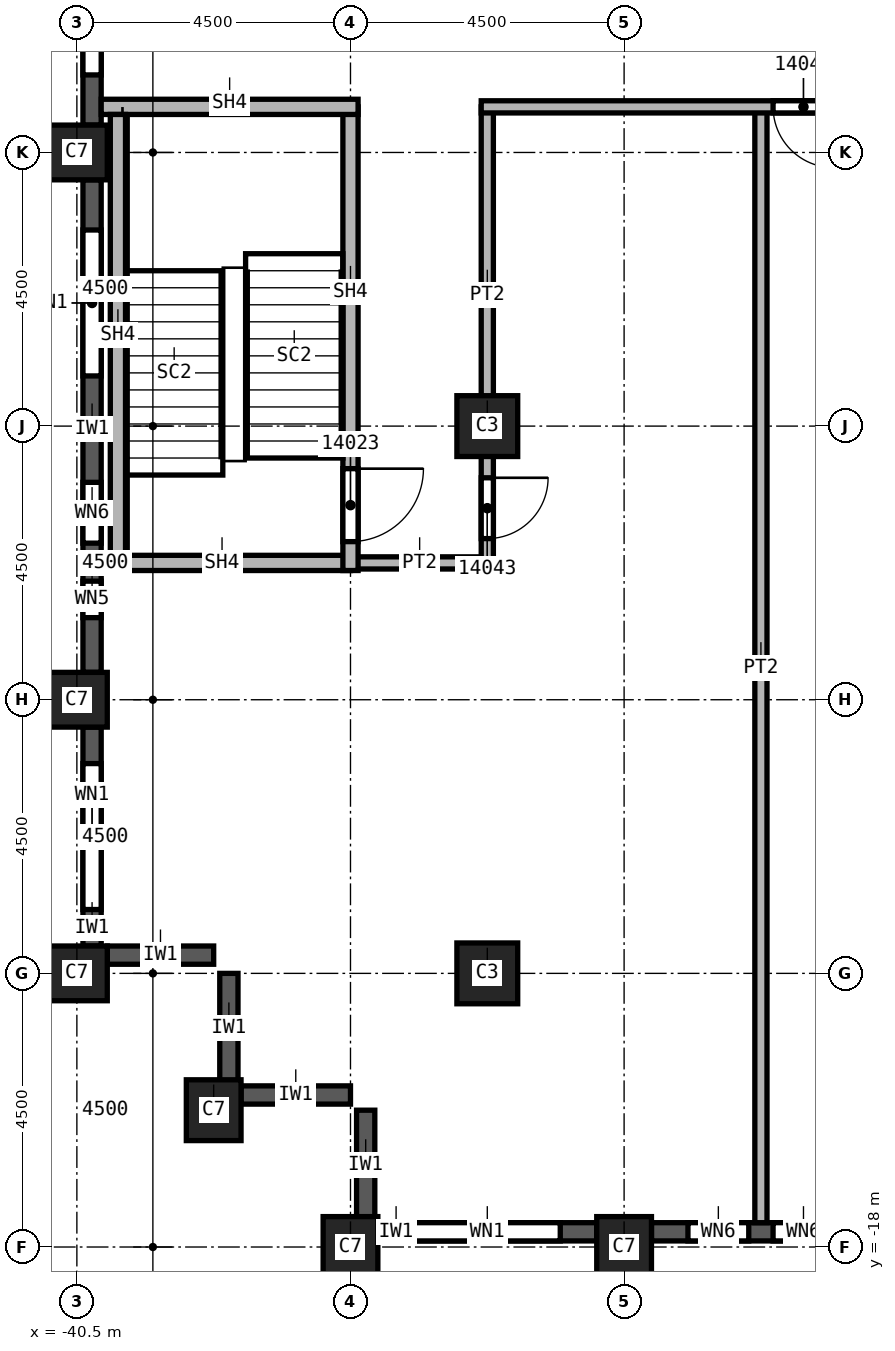
"""IFC4 building model, lengths in metres.
Left out: names, types, materials, properties, quantities, classifications, styles, units other than length and angle.
Written with IfcOpenShell. Run it as: python <this file> out.ifc"""

import sys

from ifc_helpers import new_model, si_unit, direction, frame, frame_2d, origin, origin_2d, place, context, subcontext, project, spatial, rectangle, extrude, element, fill, save


model = new_model("IFC4")
c1 = context("Model", 3, precision=1e-05, world=origin(), true_north=direction((0.0, 1.0)))
c2 = subcontext(c1, "Body", "Model", "MODEL_VIEW")
j1 = project(units=[si_unit("LENGTHUNIT", "METRE"), si_unit("PLANEANGLEUNIT", "RADIAN")], contexts=[c1])
p1 = place(None, origin())
s1 = spatial("IfcSite", under=j1, at=p1, CompositionType="ELEMENT")
p2 = place(p1, origin())
s2 = spatial("IfcBuilding", under=s1, at=p2, CompositionType="ELEMENT")
p3 = place(p2, frame((0.0, 0.0, 220.0)))
s3 = spatial("IfcBuildingStorey", under=s2, at=p3, CompositionType="ELEMENT", Elevation=220.0)
for number, where, z_axis, x_axis in (
    (1, (-40.5, 0.0, 0.0), (0.0, 0.0, 1.0), (0.0, 1.0, 0.0)),
    (2, (-40.5, -9.0, 0.0), (0.0, 0.0, 1.0), (0.0, 1.0, 0.0)),
    (3, (-40.5, -13.5, 0.0), (0.0, 0.0, 1.0), (0.0, 1.0, 0.0)),
    (4, (-38.25, -15.75, 0.0), (0.0, 0.0, 1.0), (1.0, 0.0, 0.0)),
    (5, (-31.5, -18.0, 0.0), (0.0, 0.0, 1.0), (1.0, 0.0, 0.0)),
    (6, (-36.0, -18.0, 0.0), (0.0, 0.0, 1.0), (1.0, 0.0, 0.0)),
):
    element("IfcColumn", number, at=place(p3, frame(where, z_axis=z_axis, x_axis=x_axis)), inside=s3, PredefinedType="COLUMN", context=c2, shape_type="SweptSolid", body=[
        extrude(rectangle(XDim=0.9, YDim=1.0, at=origin_2d()), origin(), (0.0, 0.0, 1.0), 3.72),
    ])
for number, where, z_axis, x_axis in (
    (7, (-33.75, -4.5, 0.0), (0.0, 0.0, 1.0), (1.0, 0.0, 0.0)),
    (8, (-33.75, -13.5, 0.0), (0.0, 0.0, 1.0), (1.0, 0.0, 0.0)),
):
    element("IfcColumn", number, at=place(p3, frame(where, z_axis=z_axis, x_axis=x_axis)), inside=s3, PredefinedType="COLUMN", context=c2, shape_type="SweptSolid", body=[
        extrude(rectangle(XDim=1.0, YDim=1.0, at=origin_2d()), origin(), (0.0, 0.0, 1.0), 3.72),
    ])
p4 = place(p3, frame((-40.0, -13.2, 0.0), z_axis=(0.0, 0.0, 1.0), x_axis=(1.0, 0.0, 0.0)))
e9 = element("IfcWall", 9, at=p4, inside=s3, PredefinedType="SOLIDWALL", context=c2, shape_type="SweptSolid", body=[
    extrude(rectangle(XDim=1.75, YDim=0.3, at=frame_2d((0.875, 0.0))), origin(), (0.0, 0.0, 1.0), 3.12),
])
for number, where, z_axis, x_axis in (
    (10, (-38.0, -15.3, 0.0), (0.0, 0.0, 1.0), (0.0, 1.0, 0.0)),
    (11, (-37.8, -15.5, 0.0), (0.0, 0.0, 1.0), (1.0, 0.0, 0.0)),
    (12, (-35.75, -17.55, 0.0), (0.0, 0.0, 1.0), (0.0, 1.0, 0.0)),
):
    element("IfcWall", number, at=place(p3, frame(where, z_axis=z_axis, x_axis=x_axis)), inside=s3, PredefinedType="SOLIDWALL", context=c2, shape_type="SweptSolid", body=[
        extrude(rectangle(XDim=1.8, YDim=0.3, at=frame_2d((0.9, 0.0))), origin(), (0.0, 0.0, 1.0), 3.12),
    ])
p5 = place(p3, frame((-40.25, 8.55, 0.0), z_axis=(0.0, 0.0, 1.0), x_axis=(0.0, -1.0, 0.0)))
e13 = element("IfcWall", 13, at=p5, inside=s3, PredefinedType="SOLIDWALL", context=c2, shape_type="SweptSolid", body=[
    extrude(rectangle(XDim=8.1, YDim=0.3, at=frame_2d((4.05, 0.0))), origin(), (0.0, 0.0, 1.0), 3.12),
])
p6 = place(p5, frame((0.825, 0.0, 0.8)))
e14 = element("IfcOpeningElement", 14, at=p6, cuts=e13, PredefinedType="OPENING", context=c2, shape_type="SweptSolid", body=[
    extrude(rectangle(XDim=2.4, YDim=1.95, at=frame_2d((1.2, 0.975))), frame((0.0, 0.15, 0.0), z_axis=(0.0, -1.0, 0.0), x_axis=(1.0, 0.0, 0.0)), (0.0, 0.0, 1.0), 0.3),
])
p7 = place(p5, frame((4.875, 0.0, 0.8)))
e15 = element("IfcOpeningElement", 15, at=p7, cuts=e13, PredefinedType="OPENING", context=c2, shape_type="SweptSolid", body=[
    extrude(rectangle(XDim=2.4, YDim=1.95, at=frame_2d((1.2, 0.975))), frame((0.0, 0.15, 0.0), z_axis=(0.0, -1.0, 0.0), x_axis=(1.0, 0.0, 0.0)), (0.0, 0.0, 1.0), 0.3),
])
p8 = place(p3, frame((-40.25, -0.45, 0.0), z_axis=(0.0, 0.0, 1.0), x_axis=(0.0, -1.0, 0.0)))
e16 = element("IfcWall", 16, at=p8, inside=s3, PredefinedType="SOLIDWALL", context=c2, shape_type="SweptSolid", body=[
    extrude(rectangle(XDim=8.1, YDim=0.3, at=frame_2d((4.05, 0.0))), origin(), (0.0, 0.0, 1.0), 3.12),
])
p9 = place(p8, frame((0.825, 0.0, 0.8)))
e17 = element("IfcOpeningElement", 17, at=p9, cuts=e16, PredefinedType="OPENING", context=c2, shape_type="SweptSolid", body=[
    extrude(rectangle(XDim=2.4, YDim=1.95, at=frame_2d((1.2, 0.975))), frame((0.0, 0.15, 0.0), z_axis=(0.0, -1.0, 0.0), x_axis=(1.0, 0.0, 0.0)), (0.0, 0.0, 1.0), 0.3),
])
p10 = place(p8, frame((4.975, 0.0, 0.8)))
e18 = element("IfcOpeningElement", 18, at=p10, cuts=e16, PredefinedType="OPENING", context=c2, shape_type="SweptSolid", body=[
    extrude(rectangle(XDim=1.0, YDim=1.95, at=frame_2d((0.5, 0.975))), frame((0.0, 0.15, 0.0), z_axis=(0.0, -1.0, 0.0), x_axis=(1.0, 0.0, 0.0)), (0.0, 0.0, 1.0), 0.3),
])
p11 = place(p8, frame((6.6, 0.0, 0.8)))
e19 = element("IfcOpeningElement", 19, at=p11, cuts=e16, PredefinedType="OPENING", context=c2, shape_type="SweptSolid", body=[
    extrude(rectangle(XDim=0.6, YDim=1.95, at=frame_2d((0.3, 0.975))), frame((0.0, 0.15, 0.0), z_axis=(0.0, -1.0, 0.0), x_axis=(1.0, 0.0, 0.0)), (0.0, 0.0, 1.0), 0.3),
])
p12 = place(p3, frame((-40.25, -9.45, 0.0), z_axis=(0.0, 0.0, 1.0), x_axis=(0.0, -1.0, 0.0)))
e20 = element("IfcWall", 20, at=p12, inside=s3, PredefinedType="SOLIDWALL", context=c2, shape_type="SweptSolid", body=[
    extrude(rectangle(XDim=3.6, YDim=0.3, at=frame_2d((1.8, 0.0))), origin(), (0.0, 0.0, 1.0), 3.12),
])
p13 = place(p12, frame((0.6, 0.0, 0.8)))
e21 = element("IfcOpeningElement", 21, at=p13, cuts=e20, PredefinedType="OPENING", context=c2, shape_type="SweptSolid", body=[
    extrude(rectangle(XDim=2.4, YDim=1.95, at=frame_2d((1.2, 0.975))), frame((0.0, 0.15, 0.0), z_axis=(0.0, -1.0, 0.0), x_axis=(1.0, 0.0, 0.0)), (0.0, 0.0, 1.0), 0.3),
])
p14 = place(p3, frame((-35.55, -17.75, 0.0), z_axis=(0.0, 0.0, 1.0), x_axis=(1.0, 0.0, 0.0)))
e22 = element("IfcWall", 22, at=p14, inside=s3, PredefinedType="SOLIDWALL", context=c2, shape_type="SweptSolid", body=[
    extrude(rectangle(XDim=3.6, YDim=0.3, at=frame_2d((1.8, 0.0))), origin(), (0.0, 0.0, 1.0), 3.12),
])
p15 = place(p14, frame((0.6, 0.0, 0.8)))
e23 = element("IfcOpeningElement", 23, at=p15, cuts=e22, PredefinedType="OPENING", context=c2, shape_type="SweptSolid", body=[
    extrude(rectangle(XDim=2.4, YDim=1.95, at=frame_2d((1.2, 0.975))), frame((0.0, 0.15, 0.0), z_axis=(0.0, -1.0, 0.0), x_axis=(1.0, 0.0, 0.0)), (0.0, 0.0, 1.0), 0.3),
])
p16 = place(p3, frame((-31.05, -17.75, 0.0), z_axis=(0.0, 0.0, 1.0), x_axis=(1.0, 0.0, 0.0)))
e24 = element("IfcWall", 24, at=p16, inside=s3, PredefinedType="SOLIDWALL", context=c2, shape_type="SweptSolid", body=[
    extrude(rectangle(XDim=3.6, YDim=0.3, at=frame_2d((1.8, 0.0))), origin(), (0.0, 0.0, 1.0), 3.12),
])
p17 = place(p16, frame((0.6, 0.0, 0.8)))
e25 = element("IfcOpeningElement", 25, at=p17, cuts=e24, PredefinedType="OPENING", context=c2, shape_type="SweptSolid", body=[
    extrude(rectangle(XDim=1.0, YDim=1.95, at=frame_2d((0.5, 0.975))), frame((0.0, 0.15, 0.0), z_axis=(0.0, -1.0, 0.0), x_axis=(1.0, 0.0, 0.0)), (0.0, 0.0, 1.0), 0.3),
])
p18 = place(p16, frame((2.0, 0.0, 0.8)))
e26 = element("IfcOpeningElement", 26, at=p18, cuts=e24, PredefinedType="OPENING", context=c2, shape_type="SweptSolid", body=[
    extrude(rectangle(XDim=1.0, YDim=1.95, at=frame_2d((0.5, 0.975))), frame((0.0, 0.15, 0.0), z_axis=(0.0, -1.0, 0.0), x_axis=(1.0, 0.0, 0.0)), (0.0, 0.0, 1.0), 0.3),
])
p19 = place(p3, frame((-33.75, -6.75, 0.0), z_axis=(0.0, 0.0, 1.0), x_axis=(-1.0, 0.0, 0.0)))
e27 = element("IfcWall", 27, at=p19, inside=s3, PredefinedType="PARTITIONING", context=c2, shape_type="SweptSolid", body=[
    extrude(rectangle(XDim=2.25, YDim=0.2, at=frame_2d((1.125, 0.0))), origin(), (0.0, 0.0, 1.0), 3.72),
])
p20 = place(p3, frame((-33.75, 0.75, 0.0), z_axis=(0.0, 0.0, 1.0), x_axis=(0.0, -1.0, 0.0)))
e28 = element("IfcWall", 28, at=p20, inside=s3, PredefinedType="PARTITIONING", context=c2, shape_type="SweptSolid", body=[
    extrude(rectangle(XDim=7.6, YDim=0.2, at=frame_2d((3.8, 0.0))), origin(), (0.0, 0.0, 1.0), 3.72),
])
p21 = place(p20, frame((6.1, 0.0, 0.0)))
e29 = element("IfcOpeningElement", 29, at=p21, cuts=e28, PredefinedType="OPENING", context=c2, shape_type="SweptSolid", body=[
    extrude(rectangle(XDim=1.0, YDim=2.1, at=frame_2d((0.5, 1.05))), frame((0.0, 0.1, 0.0), z_axis=(0.0, -1.0, 0.0), x_axis=(1.0, 0.0, 0.0)), (0.0, 0.0, 1.0), 0.2),
])
p22 = place(p3, frame((-29.25, 0.75, 0.0), z_axis=(0.0, 0.0, 1.0), x_axis=(0.0, -1.0, 0.0)))
e30 = element("IfcWall", 30, at=p22, inside=s3, PredefinedType="PARTITIONING", context=c2, shape_type="SweptSolid", body=[
    extrude(rectangle(XDim=18.35, YDim=0.2, at=frame_2d((9.175, 0.0))), origin(), (0.0, 0.0, 1.0), 3.72),
])
p23 = place(p3, frame((-19.9, 0.75, 0.0), z_axis=(0.0, 0.0, 1.0), x_axis=(-1.0, 0.0, 0.0)))
e31 = element("IfcWall", 31, at=p23, inside=s3, PredefinedType="PARTITIONING", context=c2, shape_type="SweptSolid", body=[
    extrude(rectangle(XDim=13.95, YDim=0.2, at=frame_2d((6.975, 0.0))), origin(), (0.0, 0.0, 1.0), 3.72),
])
p24 = place(p23, frame((8.15, 0.0, 0.0)))
e32 = element("IfcOpeningElement", 32, at=p24, cuts=e31, PredefinedType="OPENING", context=c2, shape_type="SweptSolid", body=[
    extrude(rectangle(XDim=1.0, YDim=2.1, at=frame_2d((0.5, 1.05))), frame((0.0, 0.1, 0.0), z_axis=(0.0, -1.0, 0.0), x_axis=(1.0, 0.0, 0.0)), (0.0, 0.0, 1.0), 0.2),
])
p25 = place(p3, frame((-36.0, -6.75, 0.0), z_axis=(0.0, 0.0, 1.0), x_axis=(-1.0, 0.0, 0.0)))
e33 = element("IfcWall", 33, at=p25, inside=s3, PredefinedType="SOLIDWALL", context=c2, shape_type="SweptSolid", body=[
    extrude(rectangle(XDim=4.1, YDim=0.25, at=frame_2d((2.05, 0.0))), origin(), (0.0, 0.0, 1.0), 3.72),
])
p26 = place(p3, frame((-36.0, 0.75, 0.0), z_axis=(0.0, 0.0, 1.0), x_axis=(0.0, -1.0, 0.0)))
e34 = element("IfcWall", 34, at=p26, inside=s3, PredefinedType="SOLIDWALL", context=c2, shape_type="SweptSolid", body=[
    extrude(rectangle(XDim=7.625, YDim=0.25, at=frame_2d((3.812, 0.0))), origin(), (0.0, 0.0, 1.0), 3.72),
])
p27 = place(p26, frame((5.95, 0.0, 0.0)))
e35 = element("IfcOpeningElement", 35, at=p27, cuts=e34, PredefinedType="OPENING", context=c2, shape_type="SweptSolid", body=[
    extrude(rectangle(XDim=1.2, YDim=2.1, at=frame_2d((0.6, 1.05))), frame((0.0, 0.125, 0.0), z_axis=(0.0, -1.0, 0.0), x_axis=(1.0, 0.0, 0.0)), (0.0, 0.0, 1.0), 0.25),
])
p28 = place(p3, frame((-35.875, 0.75, 0.0), z_axis=(0.0, 0.0, 1.0), x_axis=(-1.0, 0.0, 0.0)))
e36 = element("IfcWall", 36, at=p28, inside=s3, PredefinedType="SOLIDWALL", context=c2, shape_type="SweptSolid", body=[
    extrude(rectangle(XDim=4.225, YDim=0.25, at=frame_2d((2.113, 0.0))), origin(), (0.0, 0.0, 1.0), 3.72),
])
p29 = place(p3, frame((-39.825, -6.625, 0.0), z_axis=(0.0, 0.0, 1.0), x_axis=(0.0, 1.0, 0.0)))
e37 = element("IfcWall", 37, at=p29, inside=s3, PredefinedType="SOLIDWALL", context=c2, shape_type="SweptSolid", body=[
    extrude(rectangle(XDim=7.25, YDim=0.25, at=frame_2d((3.625, 0.0))), origin(), (0.0, 0.0, 1.0), 3.72),
])
p30 = place(p7, origin())
e38 = element("IfcWindow", 38, at=p30, inside=s3, PartitioningType="SINGLE_PANEL", PredefinedType="WINDOW", context=c2, shape_type="SweptSolid", body=[
    extrude(rectangle(XDim=2.4, YDim=1.95, at=frame_2d((1.2, 0.975))), frame((0.0, 0.03, 0.0), z_axis=(0.0, -1.0, 0.0), x_axis=(1.0, 0.0, 0.0)), (0.0, 0.0, 1.0), 0.06),
])
fill(e15, e38)
p31 = place(p9, origin())
e39 = element("IfcWindow", 39, at=p31, inside=s3, PartitioningType="SINGLE_PANEL", PredefinedType="WINDOW", context=c2, shape_type="SweptSolid", body=[
    extrude(rectangle(XDim=2.4, YDim=1.95, at=frame_2d((1.2, 0.975))), frame((0.0, 0.03, 0.0), z_axis=(0.0, -1.0, 0.0), x_axis=(1.0, 0.0, 0.0)), (0.0, 0.0, 1.0), 0.06),
])
fill(e17, e39)
p32 = place(p13, origin())
e40 = element("IfcWindow", 40, at=p32, inside=s3, PartitioningType="SINGLE_PANEL", PredefinedType="WINDOW", context=c2, shape_type="SweptSolid", body=[
    extrude(rectangle(XDim=2.4, YDim=1.95, at=frame_2d((1.2, 0.975))), frame((0.0, 0.03, 0.0), z_axis=(0.0, -1.0, 0.0), x_axis=(1.0, 0.0, 0.0)), (0.0, 0.0, 1.0), 0.06),
])
fill(e21, e40)
p33 = place(p15, origin())
e41 = element("IfcWindow", 41, at=p33, inside=s3, PartitioningType="SINGLE_PANEL", PredefinedType="WINDOW", context=c2, shape_type="SweptSolid", body=[
    extrude(rectangle(XDim=2.4, YDim=1.95, at=frame_2d((1.2, 0.975))), frame((0.0, 0.03, 0.0), z_axis=(0.0, -1.0, 0.0), x_axis=(1.0, 0.0, 0.0)), (0.0, 0.0, 1.0), 0.06),
])
fill(e23, e41)
p34 = place(p27, origin())
e42 = element("IfcDoor", 42, at=p34, inside=s3, OperationType="SINGLE_SWING_RIGHT", PredefinedType="DOOR", context=c2, shape_type="SweptSolid", body=[
    extrude(rectangle(XDim=1.2, YDim=2.1, at=frame_2d((0.6, 1.05))), frame((0.0, 0.025, 0.0), z_axis=(0.0, -1.0, 0.0), x_axis=(1.0, 0.0, 0.0)), (0.0, 0.0, 1.0), 0.05),
])
fill(e35, e42)
p35 = place(p21, origin())
e43 = element("IfcDoor", 43, at=p35, inside=s3, OperationType="SINGLE_SWING_RIGHT", PredefinedType="DOOR", context=c2, shape_type="SweptSolid", body=[
    extrude(rectangle(XDim=1.0, YDim=2.1, at=frame_2d((0.5, 1.05))), frame((0.0, 0.025, 0.0), z_axis=(0.0, -1.0, 0.0), x_axis=(1.0, 0.0, 0.0)), (0.0, 0.0, 1.0), 0.05),
])
fill(e29, e43)
p36 = place(p24, origin())
e44 = element("IfcDoor", 44, at=p36, inside=s3, OperationType="SINGLE_SWING_LEFT", PredefinedType="DOOR", context=c2, shape_type="SweptSolid", body=[
    extrude(rectangle(XDim=1.0, YDim=2.1, at=frame_2d((0.5, 1.05))), frame((0.0, 0.025, 0.0), z_axis=(0.0, -1.0, 0.0), x_axis=(1.0, 0.0, 0.0)), (0.0, 0.0, 1.0), 0.05),
])
fill(e32, e44)
p37 = place(p10, origin())
e45 = element("IfcWindow", 45, at=p37, inside=s3, PartitioningType="SINGLE_PANEL", PredefinedType="WINDOW", context=c2, shape_type="SweptSolid", body=[
    extrude(rectangle(XDim=1.0, YDim=1.95, at=frame_2d((0.5, 0.975))), frame((0.0, 0.03, 0.0), z_axis=(0.0, -1.0, 0.0), x_axis=(1.0, 0.0, 0.0)), (0.0, 0.0, 1.0), 0.06),
])
fill(e18, e45)
p38 = place(p11, origin())
e46 = element("IfcWindow", 46, at=p38, inside=s3, PartitioningType="SINGLE_PANEL", PredefinedType="WINDOW", context=c2, shape_type="SweptSolid", body=[
    extrude(rectangle(XDim=0.6, YDim=1.95, at=frame_2d((0.3, 0.975))), frame((0.0, 0.03, 0.0), z_axis=(0.0, -1.0, 0.0), x_axis=(1.0, 0.0, 0.0)), (0.0, 0.0, 1.0), 0.06),
])
fill(e19, e46)
p39 = place(p17, origin())
e47 = element("IfcWindow", 47, at=p39, inside=s3, PartitioningType="SINGLE_PANEL", PredefinedType="WINDOW", context=c2, shape_type="SweptSolid", body=[
    extrude(rectangle(XDim=1.0, YDim=1.95, at=frame_2d((0.5, 0.975))), frame((0.0, 0.03, 0.0), z_axis=(0.0, -1.0, 0.0), x_axis=(1.0, 0.0, 0.0)), (0.0, 0.0, 1.0), 0.06),
])
fill(e25, e47)
p40 = place(p18, origin())
e48 = element("IfcWindow", 48, at=p40, inside=s3, PartitioningType="SINGLE_PANEL", PredefinedType="WINDOW", context=c2, shape_type="SweptSolid", body=[
    extrude(rectangle(XDim=1.0, YDim=1.95, at=frame_2d((0.5, 0.975))), frame((0.0, 0.03, 0.0), z_axis=(0.0, -1.0, 0.0), x_axis=(1.0, 0.0, 0.0)), (0.0, 0.0, 1.0), 0.06),
])
fill(e26, e48)
save(model, sys.argv[1])
